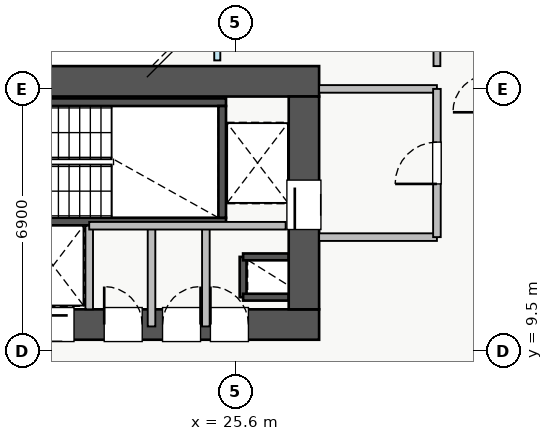
"""IFC4 building model, lengths in metres.
Left out: names, types, materials, properties, quantities, classifications, styles, units other than length and angle.
Written with IfcOpenShell. Run it as: python <this file> out.ifc"""

import sys

from ifc_helpers import new_model, si_unit, direction, frame, frame_2d, origin, place, context, subcontext, project, spatial, rectangle, extrude, source, transform, mapped, element, fill, save


model = new_model("IFC4")
c1 = context("Model", 3, precision=1e-05, world=origin(), true_north=direction((0.0, 1.0)))
c2 = subcontext(c1, "Body", "Model", "MODEL_VIEW")
j1 = project(units=[si_unit("LENGTHUNIT", "METRE"), si_unit("PLANEANGLEUNIT", "RADIAN")], contexts=[c1])
p1 = place(None, origin())
s1 = spatial("IfcSite", under=j1, at=p1, CompositionType="ELEMENT")
p2 = place(p1, origin())
s2 = spatial("IfcBuilding", under=s1, at=p2, CompositionType="ELEMENT")
p3 = place(p2, frame((0.0, 0.0, 26.25)))
s3 = spatial("IfcBuildingStorey", under=s2, at=p3, CompositionType="ELEMENT", Elevation=26.25)
p4 = place(p3, frame((25.8, 10.92, 0.0), z_axis=(0.0, 0.0, 1.0), x_axis=(0.0, 1.0, 0.0)))
e1 = element("IfcWall", 1, at=p4, inside=s3, PredefinedType="SHEAR", context=c2, shape_type="SweptSolid", body=[
    extrude(rectangle(XDim=1.06, YDim=0.18, at=frame_2d((0.53, 0.0))), origin(), (0.0, 0.0, 1.0), 3.07),
])
for number, where, z_axis, x_axis in (
    (2, (25.8, 11.98, 0.0), (0.0, 0.0, 1.0), (1.0, 0.0, 0.0)),
    (3, (25.8, 10.92, 0.0), (0.0, 0.0, 1.0), (1.0, 0.0, 0.0)),
):
    element("IfcWall", number, at=place(p3, frame(where, z_axis=z_axis, x_axis=x_axis)), inside=s3, PredefinedType="SHEAR", context=c2, shape_type="SweptSolid", body=[
        extrude(rectangle(XDim=1.2, YDim=0.18, at=frame_2d((0.6, 0.0))), origin(), (0.0, 0.0, 1.0), 3.07),
    ])
p5 = place(p3, frame((19.88, 12.8, 0.0), z_axis=(0.0, 0.0, 1.0), x_axis=(1.0, 0.0, 0.0)))
e4 = element("IfcWall", 4, at=p5, inside=s3, PredefinedType="SHEAR", context=c2, shape_type="SweptSolid", body=[
    extrude(rectangle(XDim=1.87, YDim=0.18, at=frame_2d((0.935, 0.0))), origin(), (0.0, 0.0, 1.0), 3.07),
])
p6 = place(p3, frame((18.2, 12.91, 0.0), z_axis=(0.0, 0.0, 1.0), x_axis=(1.0, 0.0, 0.0)))
e5 = element("IfcWall", 5, at=p6, inside=s3, PredefinedType="SHEAR", context=c2, shape_type="SweptSolid", body=[
    extrude(rectangle(XDim=7.15, YDim=0.2, at=frame_2d((3.575, 0.0))), origin(), (0.0, 0.0, 1.0), 3.25),
])
p7 = place(p6, frame((0.35, 0.0, 0.0)))
e6 = element("IfcOpeningElement", 6, at=p7, cuts=e5, PredefinedType="OPENING", context=c2, shape_type="SweptSolid", body=[
    extrude(rectangle(XDim=1.1, YDim=2.05, at=frame_2d((0.55, 1.025))), frame((0.0, 0.11, 0.0), z_axis=(0.0, -1.0, 0.0), x_axis=(1.0, 0.0, 0.0)), (0.0, 0.0, 1.0), 0.22),
])
p8 = place(p3, frame((18.2, 16.05, 0.0), z_axis=(0.0, 0.0, 1.0), x_axis=(1.0, 0.0, 0.0)))
e7 = element("IfcWall", 7, at=p8, inside=s3, PredefinedType="SHEAR", context=c2, shape_type="SweptSolid", body=[
    extrude(rectangle(XDim=7.15, YDim=0.2, at=frame_2d((3.575, 0.0))), origin(), (0.0, 0.0, 1.0), 3.25),
])
p9 = place(p3, frame((25.25, 13.01, 0.0), z_axis=(0.0, 0.0, 1.0), x_axis=(0.0, 1.0, 0.0)))
e8 = element("IfcWall", 8, at=p9, inside=s3, PredefinedType="SHEAR", context=c2, shape_type="SweptSolid", body=[
    extrude(rectangle(XDim=2.94, YDim=0.2, at=frame_2d((1.47, 0.0))), origin(), (0.0, 0.0, 1.0), 3.25),
])
p10 = place(p3, frame((10.2, 10.2, 0.0), z_axis=(0.0, 0.0, 1.0), x_axis=(1.0, 0.0, 0.0)))
e9 = element("IfcWall", 9, at=p10, inside=s3, PredefinedType="SHEAR", context=c2, shape_type="SweptSolid", body=[
    extrude(rectangle(XDim=17.6, YDim=0.8, at=frame_2d((8.8, 0.0))), origin(), (0.0, 0.0, 1.0), 3.25),
])
p11 = place(p10, frame((1.15, 0.0, 0.0)))
e10 = element("IfcOpeningElement", 10, at=p11, cuts=e9, PredefinedType="OPENING", context=c2, shape_type="SweptSolid", body=[
    extrude(rectangle(XDim=1.1, YDim=2.05, at=frame_2d((0.55, 1.025))), frame((0.0, 0.41, 0.0), z_axis=(0.0, -1.0, 0.0), x_axis=(1.0, 0.0, 0.0)), (0.0, 0.0, 1.0), 0.82),
])
p12 = place(p10, frame((8.3, 0.0, 0.0)))
e11 = element("IfcOpeningElement", 11, at=p12, cuts=e9, PredefinedType="OPENING", context=c2, shape_type="SweptSolid", body=[
    extrude(rectangle(XDim=1.1, YDim=2.05, at=frame_2d((0.55, 1.025))), frame((0.0, 0.41, 0.0), z_axis=(0.0, -1.0, 0.0), x_axis=(1.0, 0.0, 0.0)), (0.0, 0.0, 1.0), 0.82),
])
p13 = place(p10, frame((10.05, 0.0, 0.0)))
e12 = element("IfcOpeningElement", 12, at=p13, cuts=e9, PredefinedType="OPENING", context=c2, shape_type="SweptSolid", body=[
    extrude(rectangle(XDim=1.1, YDim=2.05, at=frame_2d((0.55, 1.025))), frame((0.0, 0.41, 0.0), z_axis=(0.0, -1.0, 0.0), x_axis=(1.0, 0.0, 0.0)), (0.0, 0.0, 1.0), 0.82),
])
p14 = place(p10, frame((14.74, 0.0, 0.0)))
e13 = element("IfcOpeningElement", 13, at=p14, cuts=e9, PredefinedType="OPENING", context=c2, shape_type="SweptSolid", body=[
    extrude(rectangle(XDim=1.0, YDim=2.05, at=frame_2d((0.5, 1.025))), frame((0.0, 0.41, 0.0), z_axis=(0.0, -1.0, 0.0), x_axis=(1.0, 0.0, 0.0)), (0.0, 0.0, 1.0), 0.82),
])
p15 = place(p10, frame((11.945, 0.0, 0.0)))
e14 = element("IfcOpeningElement", 14, at=p15, cuts=e9, PredefinedType="OPENING", context=c2, shape_type="SweptSolid", body=[
    extrude(rectangle(XDim=1.0, YDim=2.05, at=frame_2d((0.5, 1.025))), frame((0.0, 0.41, 0.0), z_axis=(0.0, -1.0, 0.0), x_axis=(1.0, 0.0, 0.0)), (0.0, 0.0, 1.0), 0.82),
])
p16 = place(p10, frame((13.48, 0.0, 0.0)))
e15 = element("IfcOpeningElement", 15, at=p16, cuts=e9, PredefinedType="OPENING", context=c2, shape_type="SweptSolid", body=[
    extrude(rectangle(XDim=1.0, YDim=2.05, at=frame_2d((0.5, 1.025))), frame((0.0, 0.41, 0.0), z_axis=(0.0, -1.0, 0.0), x_axis=(1.0, 0.0, 0.0)), (0.0, 0.0, 1.0), 0.82),
])
p17 = place(p3, frame((10.2, 16.6, 0.0), z_axis=(0.0, 0.0, 1.0), x_axis=(1.0, 0.0, 0.0)))
e16 = element("IfcWall", 16, at=p17, inside=s3, PredefinedType="SHEAR", context=c2, shape_type="SweptSolid", body=[
    extrude(rectangle(XDim=17.6, YDim=0.8, at=frame_2d((8.8, 0.0))), origin(), (0.0, 0.0, 1.0), 3.25),
])
p18 = place(p3, frame((27.4, 10.6, 0.0), z_axis=(0.0, 0.0, 1.0), x_axis=(0.0, 1.0, 0.0)))
e17 = element("IfcWall", 17, at=p18, inside=s3, PredefinedType="SHEAR", context=c2, shape_type="SweptSolid", body=[
    extrude(rectangle(XDim=5.6, YDim=0.8, at=frame_2d((2.8, 0.0))), origin(), (0.0, 0.0, 1.0), 3.25),
])
p19 = place(p18, frame((2.1, 0.0, 0.0)))
e18 = element("IfcOpeningElement", 18, at=p19, cuts=e17, PredefinedType="OPENING", context=c2, shape_type="SweptSolid", body=[
    extrude(rectangle(XDim=1.3, YDim=2.05, at=frame_2d((0.65, 1.025))), frame((0.0, 0.41, 0.0), z_axis=(0.0, -1.0, 0.0), x_axis=(1.0, 0.0, 0.0)), (0.0, 0.0, 1.0), 0.82),
])
for number, where, z_axis, x_axis in (
    (19, (27.8, 16.4, 0.0), (0.0, 0.0, 1.0), (1.0, 0.0, 0.0)),
    (20, (27.8, 12.5, 0.0), (0.0, 0.0, 1.0), (1.0, 0.0, 0.0)),
):
    element("IfcWall", number, at=place(p3, frame(where, z_axis=z_axis, x_axis=x_axis)), inside=s3, PredefinedType="PARTITIONING", context=c2, shape_type="SweptSolid", body=[
        extrude(rectangle(XDim=3.1, YDim=0.2, at=frame_2d((1.55, 0.0))), origin(), (0.0, 0.0, 1.0), 3.07),
    ])
p20 = place(p3, frame((30.9, 12.5, 0.0), z_axis=(0.0, 0.0, 1.0), x_axis=(0.0, 1.0, 0.0)))
e21 = element("IfcWall", 21, at=p20, inside=s3, PredefinedType="PARTITIONING", context=c2, shape_type="SweptSolid", body=[
    extrude(rectangle(XDim=3.9, YDim=0.2, at=frame_2d((1.95, 0.0))), origin(), (0.0, 0.0, 1.0), 3.07),
])
p21 = place(p20, frame((1.4, 0.0, 0.0)))
e22 = element("IfcOpeningElement", 22, at=p21, cuts=e21, PredefinedType="OPENING", context=c2, shape_type="SweptSolid", body=[
    extrude(rectangle(XDim=1.1, YDim=2.05, at=frame_2d((0.55, 1.025))), frame((0.0, 0.11, 0.0), z_axis=(0.0, -1.0, 0.0), x_axis=(1.0, 0.0, 0.0)), (0.0, 0.0, 1.0), 0.22),
])
p22 = place(p3, frame((24.82, 10.15, 0.0), z_axis=(0.0, 0.0, 1.0), x_axis=(0.0, 1.0, 0.0)))
e23 = element("IfcWall", 23, at=p22, inside=s3, PredefinedType="PARTITIONING", context=c2, shape_type="SweptSolid", body=[
    extrude(rectangle(XDim=2.65, YDim=0.2, at=frame_2d((1.325, 0.0))), origin(), (0.0, 0.0, 1.0), 3.07),
])
p23 = place(p3, frame((21.75, 10.6, 0.0), z_axis=(0.0, 0.0, 1.0), x_axis=(0.0, 1.0, 0.0)))
e24 = element("IfcWall", 24, at=p23, inside=s3, PredefinedType="PARTITIONING", context=c2, shape_type="SweptSolid", body=[
    extrude(rectangle(XDim=2.2, YDim=0.2, at=frame_2d((1.1, 0.0))), origin(), (0.0, 0.0, 1.0), 3.07),
])
p24 = place(p3, frame((23.39, 10.15, 0.0), z_axis=(0.0, 0.0, 1.0), x_axis=(0.0, 1.0, 0.0)))
e25 = element("IfcWall", 25, at=p24, inside=s3, PredefinedType="PARTITIONING", context=c2, shape_type="SweptSolid", body=[
    extrude(rectangle(XDim=2.65, YDim=0.2, at=frame_2d((1.325, 0.0))), origin(), (0.0, 0.0, 1.0), 3.07),
])
p25 = place(p3, frame((21.75, 12.8, 0.0), z_axis=(0.0, 0.0, 1.0), x_axis=(1.0, 0.0, 0.0)))
e26 = element("IfcWall", 26, at=p25, inside=s3, PredefinedType="PARTITIONING", context=c2, shape_type="SweptSolid", body=[
    extrude(rectangle(XDim=5.17, YDim=0.2, at=frame_2d((2.585, 0.0))), origin(), (0.0, 0.0, 1.0), 3.07),
])
p26 = place(p3, frame((30.9, 17.0, 0.0), z_axis=(0.0, 0.0, 1.0), x_axis=(0.0, 1.0, 0.0)))
e27 = element("IfcWall", 27, at=p26, inside=s3, PredefinedType="PARTITIONING", context=c2, shape_type="SweptSolid", body=[
    extrude(rectangle(XDim=12.0, YDim=0.18, at=frame_2d((6.0, 0.0))), origin(), (0.0, 0.0, 1.0), 3.07),
])
p27 = place(p26, frame((0.855, 0.0, 0.0)))
e28 = element("IfcOpeningElement", 28, at=p27, cuts=e27, PredefinedType="OPENING", context=c2, shape_type="SweptSolid", body=[
    extrude(rectangle(XDim=1.0, YDim=2.05, at=frame_2d((0.5, 1.025))), frame((0.0, 0.1, 0.0), z_axis=(0.0, -1.0, 0.0), x_axis=(1.0, 0.0, 0.0)), (0.0, 0.0, 1.0), 0.2),
])
p28 = place(p26, frame((6.725, 0.0, 0.0)))
e29 = element("IfcOpeningElement", 29, at=p28, cuts=e27, PredefinedType="OPENING", context=c2, shape_type="SweptSolid", body=[
    extrude(rectangle(XDim=1.0, YDim=2.05, at=frame_2d((0.5, 1.025))), frame((0.0, 0.1, 0.0), z_axis=(0.0, -1.0, 0.0), x_axis=(1.0, 0.0, 0.0)), (0.0, 0.0, 1.0), 0.2),
])
m1 = source(origin(), c2, "Body", "SweptSolid", [
    extrude(rectangle(XDim=1.3, YDim=2.05, at=frame_2d((0.65, 1.025))), frame((0.0, 0.025, 0.0), z_axis=(0.0, -1.0, 0.0), x_axis=(1.0, 0.0, 0.0)), (0.0, 0.0, 1.0), 0.05),
])
p29 = place(p19, origin())
e30 = element("IfcDoor", 30, at=p29, inside=s3, OperationType="SLIDING_TO_RIGHT", PredefinedType="DOOR", context=c2, shape_type="MappedRepresentation", body=[
    mapped(m1, transform((0.0, 0.0, 0.0), x_axis=(1.0, 0.0, 0.0), y_axis=(0.0, 1.0, 0.0), z_axis=(0.0, 0.0, 1.0), scale=1.0)),
])
fill(e18, e30)
m2 = source(origin(), c2, "Body", "SweptSolid", [
    extrude(rectangle(XDim=1.1, YDim=2.05, at=frame_2d((0.55, 1.025))), frame((0.0, 0.025, 0.0), z_axis=(0.0, -1.0, 0.0), x_axis=(1.0, 0.0, 0.0)), (0.0, 0.0, 1.0), 0.05),
])
p30 = place(p13, origin())
e31 = element("IfcDoor", 31, at=p30, inside=s3, OperationType="SLIDING_TO_RIGHT", PredefinedType="DOOR", context=c2, shape_type="MappedRepresentation", body=[
    mapped(m2, transform((0.0, 0.0, 0.0), x_axis=(1.0, 0.0, 0.0), y_axis=(0.0, 1.0, 0.0), z_axis=(0.0, 0.0, 1.0), scale=1.0)),
])
fill(e12, e31)
m3 = source(origin(), c2, "Body", "SweptSolid", [
    extrude(rectangle(XDim=1.0, YDim=2.05, at=frame_2d((0.5, 1.025))), frame((0.0, 0.025, 0.0), z_axis=(0.0, -1.0, 0.0), x_axis=(1.0, 0.0, 0.0)), (0.0, 0.0, 1.0), 0.05),
])
p31 = place(p14, origin())
e32 = element("IfcDoor", 32, at=p31, inside=s3, OperationType="SINGLE_SWING_LEFT", PredefinedType="DOOR", context=c2, shape_type="MappedRepresentation", body=[
    mapped(m3, transform((0.0, 0.0, 0.0), x_axis=(1.0, 0.0, 0.0), y_axis=(0.0, 1.0, 0.0), z_axis=(0.0, 0.0, 1.0), scale=1.0)),
])
fill(e13, e32)
p32 = place(p15, origin())
e33 = element("IfcDoor", 33, at=p32, inside=s3, OperationType="SINGLE_SWING_LEFT", PredefinedType="DOOR", context=c2, shape_type="MappedRepresentation", body=[
    mapped(m3, transform((0.0, 0.0, 0.0), x_axis=(1.0, 0.0, 0.0), y_axis=(0.0, 1.0, 0.0), z_axis=(0.0, 0.0, 1.0), scale=1.0)),
])
fill(e14, e33)
p33 = place(p16, origin())
e34 = element("IfcDoor", 34, at=p33, inside=s3, OperationType="SINGLE_SWING_RIGHT", PredefinedType="DOOR", context=c2, shape_type="MappedRepresentation", body=[
    mapped(m3, transform((0.0, 0.0, 0.0), x_axis=(1.0, 0.0, 0.0), y_axis=(0.0, 1.0, 0.0), z_axis=(0.0, 0.0, 1.0), scale=1.0)),
])
fill(e15, e34)
p34 = place(p21, origin())
e35 = element("IfcDoor", 35, at=p34, inside=s3, OperationType="SINGLE_SWING_LEFT", PredefinedType="DOOR", context=c2, shape_type="MappedRepresentation", body=[
    mapped(m2, transform((0.0, 0.0, 0.0), x_axis=(1.0, 0.0, 0.0), y_axis=(0.0, 1.0, 0.0), z_axis=(0.0, 0.0, 1.0), scale=1.0)),
])
fill(e22, e35)
save(model, sys.argv[1])
